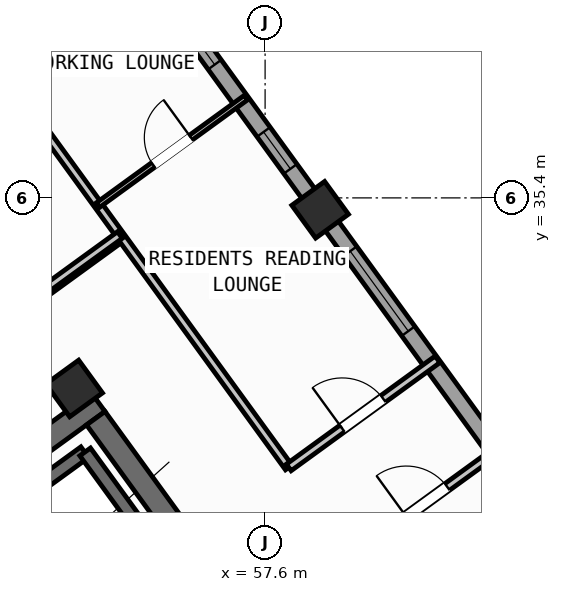
"""IFC4 building model, lengths in metres.
Left out: names, types, materials, properties, quantities, classifications, styles, units other than length and angle.
Written with IfcOpenShell. Run it as: python <this file> out.ifc"""

import sys

from ifc_helpers import new_model, si_unit, direction, frame, frame_2d, origin, origin_2d, place, context, subcontext, project, spatial, rectangle, hollow_rectangle, extrude, source, transform, mapped, element, fill, save


model = new_model("IFC4")
c1 = context("Model", 3, precision=1e-05, world=origin(), true_north=direction((0.0, 1.0)))
c2 = subcontext(c1, "Body", "Model", "MODEL_VIEW")
j1 = project(units=[si_unit("LENGTHUNIT", "METRE"), si_unit("PLANEANGLEUNIT", "RADIAN")], contexts=[c1])
p1 = place(None, origin())
s1 = spatial("IfcSite", under=j1, at=p1, CompositionType="ELEMENT")
p2 = place(p1, origin())
s2 = spatial("IfcBuilding", under=s1, at=p2, CompositionType="ELEMENT")
p3 = place(p2, frame((0.0, 0.0, 207.6)))
s3 = spatial("IfcBuildingStorey", under=s2, at=p3, CompositionType="ELEMENT", Elevation=207.6)
p4 = place(p3, frame((44.406, 24.172, 0.0), z_axis=(0.0, 0.0, 1.0), x_axis=(0.809012867805, 0.587790931986, 0.0)))
e1 = element("IfcWall", 1, at=p4, inside=s3, PredefinedType="SHEAR", context=c2, shape_type="SweptSolid", body=[
    extrude(rectangle(XDim=12.24, YDim=0.45, at=frame_2d((6.12, 0.0))), origin(), (0.0, 0.0, 1.0), 3.35),
])
p5 = place(p3, frame((58.064, 25.813, 0.0), z_axis=(0.0, 0.0, 1.0), x_axis=(-0.587774812919, 0.809024578921, 0.0)))
e2 = element("IfcWall", 2, at=p5, inside=s3, PredefinedType="SHEAR", context=c2, shape_type="SweptSolid", body=[
    extrude(rectangle(XDim=6.475, YDim=0.45, at=frame_2d((3.238, 0.0))), origin(), (0.0, 0.0, 1.0), 3.35),
])
m1 = source(origin(), c2, "Body", "SweptSolid", [
    extrude(hollow_rectangle(XDim=0.8, YDim=0.8, WallThickness=0.032, at=origin_2d()), origin(), (0.0, 0.0, 1.0), 3.6),
])
for number, where, z_axis, x_axis in (
    (3, (53.832, 31.638, 0.0), (0.0, 0.0, 1.0), (0.809, 0.588, 0.0)),
    (4, (58.686, 35.165, 0.0), (0.0, 0.0, 1.0), (0.809, 0.588, 0.0)),
):
    element("IfcColumn", number, at=place(p3, frame(where, z_axis=z_axis, x_axis=x_axis)), inside=s3, PredefinedType="COLUMN", context=c2, shape_type="MappedRepresentation", body=[
        mapped(m1, transform((0.0, 0.0, 0.0), scale=1.0)),
    ])
p6 = place(p3, frame((42.207, 31.597, 0.0), z_axis=(0.0, 0.0, 1.0), x_axis=(0.809020333377, 0.587780656523, 0.0)))
e5 = element("IfcWall", 5, at=p6, inside=s3, PredefinedType="STANDARD", context=c2, shape_type="SweptSolid", body=[
    extrude(rectangle(XDim=15.223, YDim=0.32, at=frame_2d((7.611, 0.0))), origin(), (0.0, 0.0, 1.0), 3.35),
])
p7 = place(p6, frame((12.82, 0.0, 0.0)))
e6 = element("IfcOpeningElement", 6, at=p7, cuts=e5, PredefinedType="OPENING", context=c2, shape_type="SweptSolid", body=[
    extrude(rectangle(XDim=1.05, YDim=2.15, at=frame_2d((0.525, 1.075))), frame((0.0, 0.17, 0.0), z_axis=(0.0, -1.0, 0.0), x_axis=(1.0, 0.0, 0.0)), (0.0, 0.0, 1.0), 0.34),
])
p8 = place(p6, frame((0.85, 0.0, 0.9)))
e7 = element("IfcOpeningElement", 7, at=p8, cuts=e5, PredefinedType="OPENING", context=c2, shape_type="SweptSolid", body=[
    extrude(rectangle(XDim=1.65, YDim=1.45, at=frame_2d((0.825, 0.725))), frame((0.0, 0.17, 0.0), z_axis=(0.0, -1.0, 0.0), x_axis=(1.0, 0.0, 0.0)), (0.0, 0.0, 1.0), 0.34),
])
p9 = place(p6, frame((5.769, 0.0, 0.9)))
e8 = element("IfcOpeningElement", 8, at=p9, cuts=e5, PredefinedType="OPENING", context=c2, shape_type="SweptSolid", body=[
    extrude(rectangle(XDim=1.35, YDim=1.45, at=frame_2d((0.675, 0.725))), frame((0.0, 0.17, 0.0), z_axis=(0.0, -1.0, 0.0), x_axis=(1.0, 0.0, 0.0)), (0.0, 0.0, 1.0), 0.34),
])
p10 = place(p6, frame((10.219, 0.0, 1.0)))
e9 = element("IfcOpeningElement", 9, at=p10, cuts=e5, PredefinedType="OPENING", context=c2, shape_type="SweptSolid", body=[
    extrude(rectangle(XDim=0.9, YDim=1.25, at=frame_2d((0.45, 0.625))), frame((0.0, 0.17, 0.0), z_axis=(0.0, -1.0, 0.0), x_axis=(1.0, 0.0, 0.0)), (0.0, 0.0, 1.0), 0.34),
])
p11 = place(p3, frame((54.81, 40.5, 0.0), z_axis=(0.0, 0.0, 1.0), x_axis=(0.587783625747, -0.809018176127, 0.0)))
e10 = element("IfcWall", 10, at=p11, inside=s3, PredefinedType="STANDARD", context=c2, shape_type="SweptSolid", body=[
    extrude(rectangle(XDim=21.587, YDim=0.32, at=frame_2d((10.794, 0.0))), origin(), (0.0, 0.0, 1.0), 2.825),
])
p12 = place(p11, frame((1.403, 0.0, 0.9)))
e11 = element("IfcOpeningElement", 11, at=p12, cuts=e10, PredefinedType="OPENING", context=c2, shape_type="SweptSolid", body=[
    extrude(rectangle(XDim=1.65, YDim=1.45, at=frame_2d((0.825, 0.725))), frame((0.0, 0.17, 0.0), z_axis=(0.0, -1.0, 0.0), x_axis=(1.0, 0.0, 0.0)), (0.0, 0.0, 1.0), 0.34),
])
p13 = place(p11, frame((4.695, 0.0, 1.0)))
e12 = element("IfcOpeningElement", 12, at=p13, cuts=e10, PredefinedType="OPENING", context=c2, shape_type="SweptSolid", body=[
    extrude(rectangle(XDim=0.9, YDim=1.25, at=frame_2d((0.45, 0.625))), frame((0.0, 0.17, 0.0), z_axis=(0.0, -1.0, 0.0), x_axis=(1.0, 0.0, 0.0)), (0.0, 0.0, 1.0), 0.34),
])
p14 = place(p11, frame((7.604, 0.0, 0.95)))
e13 = element("IfcOpeningElement", 13, at=p14, cuts=e10, PredefinedType="OPENING", context=c2, shape_type="SweptSolid", body=[
    extrude(rectangle(XDim=1.95, YDim=1.35, at=frame_2d((0.975, 0.675))), frame((0.0, 0.17, 0.0), z_axis=(0.0, -1.0, 0.0), x_axis=(1.0, 0.0, 0.0)), (0.0, 0.0, 1.0), 0.34),
])
p15 = place(p11, frame((15.692, 0.0, 1.0)))
e14 = element("IfcOpeningElement", 14, at=p15, cuts=e10, PredefinedType="OPENING", context=c2, shape_type="SweptSolid", body=[
    extrude(rectangle(XDim=0.9, YDim=1.25, at=frame_2d((0.45, 0.625))), frame((0.0, 0.17, 0.0), z_axis=(0.0, -1.0, 0.0), x_axis=(1.0, 0.0, 0.0)), (0.0, 0.0, 1.0), 0.34),
])
p16 = place(p11, frame((18.872, 0.0, 0.9)))
e15 = element("IfcOpeningElement", 15, at=p16, cuts=e10, PredefinedType="OPENING", context=c2, shape_type="SweptSolid", body=[
    extrude(rectangle(XDim=1.35, YDim=1.45, at=frame_2d((0.675, 0.725))), frame((0.0, 0.17, 0.0), z_axis=(0.0, -1.0, 0.0), x_axis=(1.0, 0.0, 0.0)), (0.0, 0.0, 1.0), 0.34),
])
p17 = place(p3, frame((48.006, 25.996, 0.0), z_axis=(0.0, 0.0, 1.0), x_axis=(0.80901903764, 0.587782439969, 0.0)))
e16 = element("IfcWall", 16, at=p17, inside=s3, PredefinedType="SHEAR", context=c2, shape_type="SweptSolid", body=[
    extrude(rectangle(XDim=7.46, YDim=0.26, at=frame_2d((3.73, 0.0))), origin(), (0.0, 0.0, 1.0), 3.35),
])
p18 = place(p3, frame((55.906, 27.831, 0.0), z_axis=(0.0, 0.0, 1.0), x_axis=(-0.587804123638, 0.809003283204, 0.0)))
e17 = element("IfcWall", 17, at=p18, inside=s3, PredefinedType="SHEAR", context=c2, shape_type="SweptSolid", body=[
    extrude(rectangle(XDim=3.16, YDim=0.26, at=frame_2d((1.58, 0.0))), origin(), (0.0, 0.0, 1.0), 3.35),
])
p19 = place(p3, frame((52.739, 33.143, 0.0), z_axis=(0.0, 0.0, 1.0), x_axis=(0.809000999347, 0.58780726693, 0.0)))
e18 = element("IfcWall", 18, at=p19, inside=s3, PredefinedType="PARTITIONING", context=c2, shape_type="SweptSolid", body=[
    extrude(rectangle(XDim=2.51, YDim=0.16, at=frame_2d((1.255, 0.0))), origin(), (0.0, 0.0, 1.0), 3.34),
])
p20 = place(p3, frame((58.067, 30.08, 0.0), z_axis=(0.0, 0.0, 1.0), x_axis=(-0.587787785243, 0.809015154073, 0.0)))
e19 = element("IfcWall", 19, at=p20, inside=s3, PredefinedType="PARTITIONING", context=c2, shape_type="SweptSolid", body=[
    extrude(rectangle(XDim=10.4, YDim=0.16, at=frame_2d((5.2, 0.0))), origin(), (0.0, 0.0, 1.0), 3.34),
])
p21 = place(p3, frame((59.331, 28.341, 0.0), z_axis=(0.0, 0.0, 1.0), x_axis=(0.809003564202, 0.587803736896, 0.0)))
e20 = element("IfcWall", 20, at=p21, inside=s3, PredefinedType="PARTITIONING", context=c2, shape_type="SweptSolid", body=[
    extrude(rectangle(XDim=3.63, YDim=0.16, at=frame_2d((1.815, 0.0))), origin(), (0.0, 0.0, 1.0), 3.34),
])
p22 = place(p21, frame((1.305, 0.0, 0.0)))
e21 = element("IfcOpeningElement", 21, at=p22, cuts=e20, PredefinedType="OPENING", context=c2, shape_type="SweptSolid", body=[
    extrude(rectangle(XDim=1.0, YDim=2.1, at=frame_2d((0.5, 1.05))), frame((0.0, 0.09, 0.0), z_axis=(0.0, -1.0, 0.0), x_axis=(1.0, 0.0, 0.0)), (0.0, 0.0, 1.0), 0.18),
])
p23 = place(p3, frame((58.067, 30.08, 0.0), z_axis=(0.0, 0.0, 1.0), x_axis=(0.809012309495, 0.587791700422, 0.0)))
e22 = element("IfcWall", 22, at=p23, inside=s3, PredefinedType="PARTITIONING", context=c2, shape_type="SweptSolid", body=[
    extrude(rectangle(XDim=3.63, YDim=0.16, at=frame_2d((1.815, 0.0))), origin(), (0.0, 0.0, 1.0), 3.34),
])
p24 = place(p23, frame((1.305, 0.0, 0.0)))
e23 = element("IfcOpeningElement", 23, at=p24, cuts=e22, PredefinedType="OPENING", context=c2, shape_type="SweptSolid", body=[
    extrude(rectangle(XDim=1.0, YDim=2.1, at=frame_2d((0.5, 1.05))), frame((0.0, 0.09, 0.0), z_axis=(0.0, -1.0, 0.0), x_axis=(1.0, 0.0, 0.0)), (0.0, 0.0, 1.0), 0.18),
])
p25 = place(p3, frame((54.304, 35.259, 0.0), z_axis=(0.0, 0.0, 1.0), x_axis=(0.809005039917, 0.58780170584, 0.0)))
e24 = element("IfcWall", 24, at=p25, inside=s3, PredefinedType="PARTITIONING", context=c2, shape_type="SweptSolid", body=[
    extrude(rectangle(XDim=3.61, YDim=0.11, at=frame_2d((1.805, 0.0))), origin(), (0.0, 0.0, 1.0), 3.34),
])
p26 = place(p25, frame((1.345, 0.0, 0.0)))
e25 = element("IfcOpeningElement", 25, at=p26, cuts=e24, PredefinedType="OPENING", context=c2, shape_type="SweptSolid", body=[
    extrude(rectangle(XDim=0.92, YDim=2.08, at=frame_2d((0.46, 1.04))), frame((0.0, 0.065, 0.0), z_axis=(0.0, -1.0, 0.0), x_axis=(1.0, 0.0, 0.0)), (0.0, 0.0, 1.0), 0.13),
])
p27 = place(p3, frame((42.866, 26.044, 0.0), z_axis=(0.0, 0.0, 1.0), x_axis=(0.809020254154, 0.587780765566, 0.0)))
e26 = element("IfcWall", 26, at=p27, inside=s3, PredefinedType="PARTITIONING", context=c2, shape_type="SweptSolid", body=[
    extrude(rectangle(XDim=14.67, YDim=0.16, at=frame_2d((7.335, 0.0))), origin(), (0.0, 0.0, 1.0), 3.34),
])
p28 = place(p27, frame((3.215, 0.0, 0.0)))
e27 = element("IfcOpeningElement", 27, at=p28, cuts=e26, PredefinedType="OPENING", context=c2, shape_type="SweptSolid", body=[
    extrude(rectangle(XDim=1.0, YDim=2.1, at=frame_2d((0.5, 1.05))), frame((0.0, 0.09, 0.0), z_axis=(0.0, -1.0, 0.0), x_axis=(1.0, 0.0, 0.0)), (0.0, 0.0, 1.0), 0.18),
])
p29 = place(p27, frame((9.915, 0.0, 0.0)))
e28 = element("IfcOpeningElement", 28, at=p29, cuts=e26, PredefinedType="OPENING", context=c2, shape_type="SweptSolid", body=[
    extrude(rectangle(XDim=1.0, YDim=2.1, at=frame_2d((0.5, 1.05))), frame((0.0, 0.09, 0.0), z_axis=(0.0, -1.0, 0.0), x_axis=(1.0, 0.0, 0.0)), (0.0, 0.0, 1.0), 0.18),
])
m2 = source(origin(), c2, "Body", "SweptSolid", [
    extrude(rectangle(XDim=1.65, YDim=1.45, at=frame_2d((0.825, 0.725))), frame((0.0, 0.03, 0.0), z_axis=(0.0, -1.0, 0.0), x_axis=(1.0, 0.0, 0.0)), (0.0, 0.0, 1.0), 0.06),
])
p30 = place(p12, origin())
e29 = element("IfcWindow", 29, at=p30, inside=s3, PartitioningType="SINGLE_PANEL", PredefinedType="WINDOW", context=c2, shape_type="MappedRepresentation", body=[
    mapped(m2, transform((0.0, 0.0, 0.0), scale=1.0)),
])
fill(e11, e29)
m3 = source(origin(), c2, "Body", "SweptSolid", [
    extrude(rectangle(XDim=0.9, YDim=1.25, at=frame_2d((0.45, 0.625))), frame((0.0, 0.03, 0.0), z_axis=(0.0, -1.0, 0.0), x_axis=(1.0, 0.0, 0.0)), (0.0, 0.0, 1.0), 0.06),
])
p31 = place(p13, origin())
e30 = element("IfcWindow", 30, at=p31, inside=s3, PartitioningType="SINGLE_PANEL", PredefinedType="WINDOW", context=c2, shape_type="MappedRepresentation", body=[
    mapped(m3, transform((0.0, 0.0, 0.0), scale=1.0)),
])
fill(e12, e30)
m4 = source(origin(), c2, "Body", "SweptSolid", [
    extrude(rectangle(XDim=1.95, YDim=1.35, at=frame_2d((0.975, 0.675))), frame((0.0, 0.03, 0.0), z_axis=(0.0, -1.0, 0.0), x_axis=(1.0, 0.0, 0.0)), (0.0, 0.0, 1.0), 0.06),
])
p32 = place(p14, origin())
e31 = element("IfcWindow", 31, at=p32, inside=s3, PartitioningType="SINGLE_PANEL", PredefinedType="WINDOW", context=c2, shape_type="MappedRepresentation", body=[
    mapped(m4, transform((0.0, 0.0, 0.0), scale=1.0)),
])
fill(e13, e31)
m5 = source(origin(), c2, "Body", "SweptSolid", [
    extrude(rectangle(XDim=1.0, YDim=2.1, at=frame_2d((0.5, 1.05))), frame((0.0, 0.025, 0.0), z_axis=(0.0, -1.0, 0.0), x_axis=(1.0, 0.0, 0.0)), (0.0, 0.0, 1.0), 0.05),
])
p33 = place(p24, origin())
e32 = element("IfcDoor", 32, at=p33, inside=s3, OperationType="SINGLE_SWING_LEFT", PredefinedType="DOOR", context=c2, shape_type="MappedRepresentation", body=[
    mapped(m5, transform((0.0, 0.0, 0.0), scale=1.0)),
])
fill(e23, e32)
m6 = source(origin(), c2, "Body", "SweptSolid", [
    extrude(rectangle(XDim=0.92, YDim=2.08, at=frame_2d((0.46, 1.04))), frame((0.0, 0.025, 0.0), z_axis=(0.0, -1.0, 0.0), x_axis=(1.0, 0.0, 0.0)), (0.0, 0.0, 1.0), 0.05),
])
p34 = place(p26, origin())
e33 = element("IfcDoor", 33, at=p34, inside=s3, OperationType="SINGLE_SWING_RIGHT", PredefinedType="DOOR", context=c2, shape_type="MappedRepresentation", body=[
    mapped(m6, transform((0.0, 0.0, 0.0), scale=1.0)),
])
fill(e25, e33)
p35 = place(p22, origin())
e34 = element("IfcDoor", 34, at=p35, inside=s3, OperationType="SINGLE_SWING_LEFT", PredefinedType="DOOR", context=c2, shape_type="MappedRepresentation", body=[
    mapped(m5, transform((0.0, 0.0, 0.0), scale=1.0)),
])
fill(e21, e34)
save(model, sys.argv[1])
